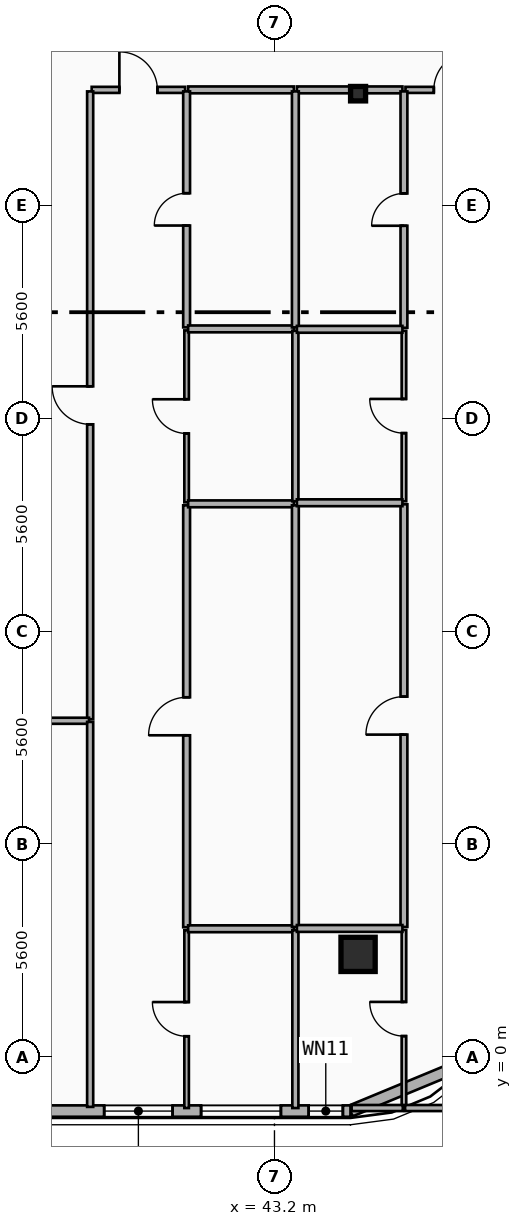
"""IFC4 building model, lengths in metres.
Left out: names, types, materials, properties, quantities, classifications, styles, units other than length and angle.
Written with IfcOpenShell. Run it as: python <this file> out.ifc"""

import sys

from ifc_helpers import new_model, si_unit, direction, frame, frame_2d, origin, origin_2d, place, context, subcontext, project, spatial, rectangle, i_section, extrude, element, fill, save


model = new_model("IFC4")
c1 = context("Model", 3, precision=1e-05, world=origin(), true_north=direction((0.0, 1.0)))
c2 = subcontext(c1, "Body", "Model", "MODEL_VIEW")
j1 = project(units=[si_unit("LENGTHUNIT", "METRE"), si_unit("PLANEANGLEUNIT", "RADIAN")], contexts=[c1])
p1 = place(None, origin())
s1 = spatial("IfcSite", under=j1, at=p1, CompositionType="ELEMENT")
p2 = place(p1, origin())
s2 = spatial("IfcBuilding", under=s1, at=p2, CompositionType="ELEMENT")
p3 = place(p2, frame((0.0, 0.0, 258.4)))
s3 = spatial("IfcBuildingStorey", under=s2, at=p3, CompositionType="ELEMENT", Elevation=258.4)
p4 = place(p3, frame((45.4, 25.35, 0.0), z_axis=(0.0, 0.0, 1.0), x_axis=(1.0, 0.0, 0.0)))
e1 = element("IfcColumn", 1, at=p4, inside=s3, PredefinedType="COLUMN", context=c2, shape_type="SweptSolid", body=[
    extrude(i_section(OverallWidth=0.395, OverallDepth=0.38, WebThickness=0.019, FlangeThickness=0.03, FilletRadius=0.015, at=origin_2d()), origin(), (0.0, 0.0, 1.0), 3.7),
])
p5 = place(p3, frame((45.4, 2.812, 0.0), z_axis=(0.0, -0.090221727315, 0.99592170371), x_axis=(1.0, 0.0, 0.0)))
e2 = element("IfcColumn", 2, at=p5, inside=s3, PredefinedType="COLUMN", context=c2, shape_type="SweptSolid", body=[
    extrude(rectangle(XDim=0.9, YDim=0.9, at=origin_2d()), origin(), (0.0, 0.0, 1.0), 3.715),
])
p6 = place(p3, frame((48.042, -0.243, 0.0), z_axis=(0.0, 0.0, 1.0), x_axis=(-0.92389884758, -0.382636798336, 0.0)))
e3 = element("IfcWall", 3, at=p6, inside=s3, PredefinedType="SOLIDWALL", context=c2, shape_type="SweptSolid", body=[
    extrude(rectangle(XDim=3.077, YDim=0.3, at=frame_2d((1.538, 0.0))), origin(), (0.0, 0.0, 1.0), 3.42),
])
p7 = place(p3, frame((45.2, -1.42, 0.0), z_axis=(0.0, 0.0, 1.0), x_axis=(-1.0, 0.0, 0.0)))
e4 = element("IfcWall", 4, at=p7, inside=s3, PredefinedType="SOLIDWALL", context=c2, shape_type="SweptSolid", body=[
    extrude(rectangle(XDim=32.8, YDim=0.3, at=frame_2d((16.4, 0.0))), origin(), (0.0, 0.0, 1.0), 3.42),
])
p8 = place(p7, frame((26.77, 0.0, 0.75)))
e5 = element("IfcOpeningElement", 5, at=p8, cuts=e4, PredefinedType="OPENING", context=c2, shape_type="SweptSolid", body=[
    extrude(rectangle(XDim=1.6, YDim=1.95, at=frame_2d((0.8, 0.975))), frame((0.0, 0.16, 0.0), z_axis=(0.0, -1.0, 0.0), x_axis=(1.0, 0.0, 0.0)), (0.0, 0.0, 1.0), 0.32),
])
p9 = place(p7, frame((29.115, 0.0, 0.75)))
e6 = element("IfcOpeningElement", 6, at=p9, cuts=e4, PredefinedType="OPENING", context=c2, shape_type="SweptSolid", body=[
    extrude(rectangle(XDim=2.1, YDim=2.1, at=frame_2d((1.05, 1.05))), frame((0.0, 0.16, 0.0), z_axis=(0.0, -1.0, 0.0), x_axis=(1.0, 0.0, 0.0)), (0.0, 0.0, 1.0), 0.32),
])
p10 = place(p7, frame((15.75, 0.0, 0.75)))
e7 = element("IfcOpeningElement", 7, at=p10, cuts=e4, PredefinedType="OPENING", context=c2, shape_type="SweptSolid", body=[
    extrude(rectangle(XDim=2.1, YDim=2.1, at=frame_2d((1.05, 1.05))), frame((0.0, 0.16, 0.0), z_axis=(0.0, -1.0, 0.0), x_axis=(1.0, 0.0, 0.0)), (0.0, 0.0, 1.0), 0.32),
])
p11 = place(p7, frame((4.681, 0.0, 0.8)))
e8 = element("IfcOpeningElement", 8, at=p11, cuts=e4, PredefinedType="OPENING", context=c2, shape_type="SweptSolid", body=[
    extrude(rectangle(XDim=1.8, YDim=1.8, at=frame_2d((0.9, 0.9))), frame((0.0, 0.16, 0.0), z_axis=(0.0, -1.0, 0.0), x_axis=(1.0, 0.0, 0.0)), (0.0, 0.0, 1.0), 0.32),
])
p12 = place(p7, frame((1.831, 0.0, 0.75)))
e9 = element("IfcOpeningElement", 9, at=p12, cuts=e4, PredefinedType="OPENING", context=c2, shape_type="SweptSolid", body=[
    extrude(rectangle(XDim=2.1, YDim=2.1, at=frame_2d((1.05, 1.05))), frame((0.0, 0.16, 0.0), z_axis=(0.0, -1.0, 0.0), x_axis=(1.0, 0.0, 0.0)), (0.0, 0.0, 1.0), 0.32),
])
p13 = place(p7, frame((0.2, 0.0, 0.9)))
e10 = element("IfcOpeningElement", 10, at=p13, cuts=e4, PredefinedType="OPENING", context=c2, shape_type="SweptSolid", body=[
    extrude(rectangle(XDim=0.9, YDim=1.05, at=frame_2d((0.45, 0.525))), frame((0.0, 0.16, 0.0), z_axis=(0.0, -1.0, 0.0), x_axis=(1.0, 0.0, 0.0)), (0.0, 0.0, 1.0), 0.32),
])
p14 = place(p7, frame((31.76, 0.0, 0.9)))
e11 = element("IfcOpeningElement", 11, at=p14, cuts=e4, PredefinedType="OPENING", context=c2, shape_type="SweptSolid", body=[
    extrude(rectangle(XDim=0.9, YDim=1.05, at=frame_2d((0.45, 0.525))), frame((0.0, 0.16, 0.0), z_axis=(0.0, -1.0, 0.0), x_axis=(1.0, 0.0, 0.0)), (0.0, 0.0, 1.0), 0.32),
])
p15 = place(p3, frame((38.39, 25.45, 0.0), z_axis=(0.0, 0.0, 1.0), x_axis=(1.0, 0.0, 0.0)))
e12 = element("IfcWall", 12, at=p15, inside=s3, PredefinedType="PARTITIONING", context=c2, shape_type="SweptSolid", body=[
    extrude(rectangle(XDim=2.458, YDim=0.16, at=frame_2d((1.229, 0.0))), origin(), (0.0, 0.0, 1.0), 3.42),
])
p16 = place(p15, frame((0.729, 0.0, 0.0)))
e13 = element("IfcOpeningElement", 13, at=p16, cuts=e12, PredefinedType="OPENING", context=c2, shape_type="SweptSolid", body=[
    extrude(rectangle(XDim=1.0, YDim=2.15, at=frame_2d((0.5, 1.075))), frame((0.0, 0.09, 0.0), z_axis=(0.0, -1.0, 0.0), x_axis=(1.0, 0.0, 0.0)), (0.0, 0.0, 1.0), 0.18),
])
p17 = place(p3, frame((40.928, 25.45, 0.0), z_axis=(0.0, 0.0, 1.0), x_axis=(1.0, 0.0, 0.0)))
e14 = element("IfcWall", 14, at=p17, inside=s3, PredefinedType="PLUMBINGWALL", context=c2, shape_type="SweptSolid", body=[
    extrude(rectangle(XDim=2.782, YDim=0.18, at=frame_2d((1.391, 0.0))), origin(), (0.0, 0.0, 1.0), 3.42),
])
p18 = place(p3, frame((46.647, 25.45, 0.0), z_axis=(0.0, 0.0, 1.0), x_axis=(1.0, 0.0, 0.0)))
e15 = element("IfcWall", 15, at=p18, inside=s3, PredefinedType="PARTITIONING", context=c2, shape_type="SweptSolid", body=[
    extrude(rectangle(XDim=2.493, YDim=0.16, at=frame_2d((1.247, 0.0))), origin(), (0.0, 0.0, 1.0), 3.42),
])
p19 = place(p18, frame((0.747, 0.0, 0.0)))
e16 = element("IfcOpeningElement", 16, at=p19, cuts=e15, PredefinedType="OPENING", context=c2, shape_type="SweptSolid", body=[
    extrude(rectangle(XDim=1.0, YDim=2.15, at=frame_2d((0.5, 1.075))), frame((0.0, 0.09, 0.0), z_axis=(0.0, -1.0, 0.0), x_axis=(1.0, 0.0, 0.0)), (0.0, 0.0, 1.0), 0.18),
])
p20 = place(p3, frame((43.79, 25.45, 0.0), z_axis=(0.0, 0.0, 1.0), x_axis=(1.0, 0.0, 0.0)))
e17 = element("IfcWall", 17, at=p20, inside=s3, PredefinedType="PLUMBINGWALL", context=c2, shape_type="SweptSolid", body=[
    extrude(rectangle(XDim=2.777, YDim=0.18, at=frame_2d((1.388, 0.0))), origin(), (0.0, 0.0, 1.0), 2.7),
])
p21 = place(p3, frame((38.35, 8.89, 0.0), z_axis=(0.0, 0.0, 1.0), x_axis=(0.0, 1.0, 0.0)))
e18 = element("IfcWall", 18, at=p21, inside=s3, PredefinedType="PARTITIONING", context=c2, shape_type="SweptSolid", body=[
    extrude(rectangle(XDim=16.52, YDim=0.16, at=frame_2d((8.26, 0.0))), origin(), (0.0, 0.0, 1.0), 2.95),
])
p22 = place(p21, frame((7.76, 0.0, 0.0)))
e19 = element("IfcOpeningElement", 19, at=p22, cuts=e18, PredefinedType="OPENING", context=c2, shape_type="SweptSolid", body=[
    extrude(rectangle(XDim=1.0, YDim=2.15, at=frame_2d((0.5, 1.075))), frame((0.0, 0.09, 0.0), z_axis=(0.0, -1.0, 0.0), x_axis=(1.0, 0.0, 0.0)), (0.0, 0.0, 1.0), 0.18),
])
p23 = place(p3, frame((40.888, -1.34, 0.0), z_axis=(0.0, 0.0, 1.0), x_axis=(0.0, 1.0, 0.0)))
e20 = element("IfcWall", 20, at=p23, inside=s3, PredefinedType="PARTITIONING", context=c2, shape_type="SweptSolid", body=[
    extrude(rectangle(XDim=4.677, YDim=0.12, at=frame_2d((2.338, 0.0))), origin(), (0.0, 0.0, 1.0), 3.08),
])
p24 = place(p23, frame((1.888, 0.0, 0.0)))
e21 = element("IfcOpeningElement", 21, at=p24, cuts=e20, PredefinedType="OPENING", context=c2, shape_type="SweptSolid", body=[
    extrude(rectangle(XDim=0.9, YDim=2.1, at=frame_2d((0.45, 1.05))), frame((0.0, 0.07, 0.0), z_axis=(0.0, -1.0, 0.0), x_axis=(1.0, 0.0, 0.0)), (0.0, 0.0, 1.0), 0.14),
])
p25 = place(p3, frame((40.888, 3.417, 0.0), z_axis=(0.0, 0.0, 1.0), x_axis=(0.0, 1.0, 0.0)))
e22 = element("IfcWall", 22, at=p25, inside=s3, PredefinedType="PLUMBINGWALL", context=c2, shape_type="SweptSolid", body=[
    extrude(rectangle(XDim=11.101, YDim=0.18, at=frame_2d((5.551, 0.0))), origin(), (0.0, 0.0, 1.0), 2.95),
])
p26 = place(p25, frame((5.051, 0.0, 0.0)))
e23 = element("IfcOpeningElement", 23, at=p26, cuts=e22, PredefinedType="OPENING", context=c2, shape_type="SweptSolid", body=[
    extrude(rectangle(XDim=1.0, YDim=2.15, at=frame_2d((0.5, 1.075))), frame((0.0, 0.1, 0.0), z_axis=(0.0, -1.0, 0.0), x_axis=(1.0, 0.0, 0.0)), (0.0, 0.0, 1.0), 0.2),
])
p27 = place(p3, frame((40.888, 14.598, 0.0), z_axis=(0.0, 0.0, 1.0), x_axis=(0.0, 1.0, 0.0)))
e24 = element("IfcWall", 24, at=p27, inside=s3, PredefinedType="PARTITIONING", context=c2, shape_type="SweptSolid", body=[
    extrude(rectangle(XDim=4.523, YDim=0.12, at=frame_2d((2.262, 0.0))), origin(), (0.0, 0.0, 1.0), 2.95),
])
p28 = place(p27, frame((1.812, 0.0, 0.0)))
e25 = element("IfcOpeningElement", 25, at=p28, cuts=e24, PredefinedType="OPENING", context=c2, shape_type="SweptSolid", body=[
    extrude(rectangle(XDim=0.9, YDim=2.1, at=frame_2d((0.45, 1.05))), frame((0.0, 0.07, 0.0), z_axis=(0.0, -1.0, 0.0), x_axis=(1.0, 0.0, 0.0)), (0.0, 0.0, 1.0), 0.14),
])
p29 = place(p3, frame((40.888, 19.201, 0.0), z_axis=(0.0, 0.0, 1.0), x_axis=(0.0, 1.0, 0.0)))
e26 = element("IfcWall", 26, at=p29, inside=s3, PredefinedType="PLUMBINGWALL", context=c2, shape_type="SweptSolid", body=[
    extrude(rectangle(XDim=6.209, YDim=0.18, at=frame_2d((3.104, 0.0))), origin(), (0.0, 0.0, 1.0), 2.95),
])
p30 = place(p29, frame((2.679, 0.0, 0.0)))
e27 = element("IfcOpeningElement", 27, at=p30, cuts=e26, PredefinedType="OPENING", context=c2, shape_type="SweptSolid", body=[
    extrude(rectangle(XDim=0.85, YDim=2.1, at=frame_2d((0.425, 1.05))), frame((0.0, 0.1, 0.0), z_axis=(0.0, -1.0, 0.0), x_axis=(1.0, 0.0, 0.0)), (0.0, 0.0, 1.0), 0.2),
])
p31 = place(p3, frame((40.928, 3.377, 0.0), z_axis=(0.0, 0.0, 1.0), x_axis=(1.0, 0.0, 0.0)))
e28 = element("IfcWall", 28, at=p31, inside=s3, PredefinedType="PLUMBINGWALL", context=c2, shape_type="SweptSolid", body=[
    extrude(rectangle(XDim=2.782, YDim=0.18, at=frame_2d((1.391, 0.0))), origin(), (0.0, 0.0, 1.0), 3.42),
])
p32 = place(p3, frame((43.75, -1.34, 0.0), z_axis=(0.0, 0.0, 1.0), x_axis=(0.0, 1.0, 0.0)))
e29 = element("IfcWall", 29, at=p32, inside=s3, PredefinedType="PARTITIONING", context=c2, shape_type="SweptSolid", body=[
    extrude(rectangle(XDim=4.677, YDim=0.16, at=frame_2d((2.338, 0.0))), origin(), (0.0, 0.0, 1.0), 3.08),
])
p33 = place(p3, frame((40.928, 14.558, 0.0), z_axis=(0.0, 0.0, 1.0), x_axis=(1.0, 0.0, 0.0)))
e30 = element("IfcWall", 30, at=p33, inside=s3, PredefinedType="PLUMBINGWALL", context=c2, shape_type="SweptSolid", body=[
    extrude(rectangle(XDim=2.782, YDim=0.18, at=frame_2d((1.391, 0.0))), origin(), (0.0, 0.0, 1.0), 2.95),
])
p34 = place(p3, frame((43.75, 3.425, 0.0), z_axis=(0.0, 0.0, 1.0), x_axis=(0.0, 1.0, 0.0)))
e31 = element("IfcWall", 31, at=p34, inside=s3, PredefinedType="PLUMBINGWALL", context=c2, shape_type="SweptSolid", body=[
    extrude(rectangle(XDim=11.093, YDim=0.18, at=frame_2d((5.546, 0.0))), origin(), (0.0, 0.0, 1.0), 2.95),
])
p35 = place(p3, frame((40.928, 19.161, 0.0), z_axis=(0.0, 0.0, 1.0), x_axis=(1.0, 0.0, 0.0)))
e32 = element("IfcWall", 32, at=p35, inside=s3, PredefinedType="PLUMBINGWALL", context=c2, shape_type="SweptSolid", body=[
    extrude(rectangle(XDim=2.782, YDim=0.18, at=frame_2d((1.391, 0.0))), origin(), (0.0, 0.0, 1.0), 2.96),
])
p36 = place(p3, frame((43.75, 14.626, 0.0), z_axis=(0.0, 0.0, 1.0), x_axis=(0.0, 1.0, 0.0)))
e33 = element("IfcWall", 33, at=p36, inside=s3, PredefinedType="PARTITIONING", context=c2, shape_type="SweptSolid", body=[
    extrude(rectangle(XDim=4.484, YDim=0.16, at=frame_2d((2.242, 0.0))), origin(), (0.0, 0.0, 1.0), 2.95),
])
p37 = place(p3, frame((43.75, 19.201, 0.0), z_axis=(0.0, 0.0, 1.0), x_axis=(0.0, 1.0, 0.0)))
e34 = element("IfcWall", 34, at=p37, inside=s3, PredefinedType="PLUMBINGWALL", context=c2, shape_type="SweptSolid", body=[
    extrude(rectangle(XDim=6.209, YDim=0.18, at=frame_2d((3.104, 0.0))), origin(), (0.0, 0.0, 1.0), 2.95),
])
p38 = place(p3, frame((46.607, -1.34, 0.0), z_axis=(0.0, 0.0, 1.0), x_axis=(0.0, 1.0, 0.0)))
e35 = element("IfcWall", 35, at=p38, inside=s3, PredefinedType="PARTITIONING", context=c2, shape_type="SweptSolid", body=[
    extrude(rectangle(XDim=4.685, YDim=0.12, at=frame_2d((2.343, 0.0))), origin(), (0.0, 0.0, 1.0), 3.42),
])
p39 = place(p38, frame((1.893, 0.0, 0.0)))
e36 = element("IfcOpeningElement", 36, at=p39, cuts=e35, PredefinedType="OPENING", context=c2, shape_type="SweptSolid", body=[
    extrude(rectangle(XDim=0.9, YDim=2.1, at=frame_2d((0.45, 1.05))), frame((0.0, 0.07, 0.0), z_axis=(0.0, -1.0, 0.0), x_axis=(1.0, 0.0, 0.0)), (0.0, 0.0, 1.0), 0.14),
])
p40 = place(p3, frame((46.607, 3.425, 0.0), z_axis=(0.0, 0.0, 1.0), x_axis=(0.0, 1.0, 0.0)))
e37 = element("IfcWall", 37, at=p40, inside=s3, PredefinedType="PLUMBINGWALL", context=c2, shape_type="SweptSolid", body=[
    extrude(rectangle(XDim=11.121, YDim=0.18, at=frame_2d((5.561, 0.0))), origin(), (0.0, 0.0, 1.0), 3.42),
])
p41 = place(p40, frame((5.061, 0.0, 0.0)))
e38 = element("IfcOpeningElement", 38, at=p41, cuts=e37, PredefinedType="OPENING", context=c2, shape_type="SweptSolid", body=[
    extrude(rectangle(XDim=1.0, YDim=2.15, at=frame_2d((0.5, 1.075))), frame((0.0, 0.1, 0.0), z_axis=(0.0, -1.0, 0.0), x_axis=(1.0, 0.0, 0.0)), (0.0, 0.0, 1.0), 0.2),
])
p42 = place(p3, frame((46.607, 14.626, 0.0), z_axis=(0.0, 0.0, 1.0), x_axis=(0.0, 1.0, 0.0)))
e39 = element("IfcWall", 39, at=p42, inside=s3, PredefinedType="PARTITIONING", context=c2, shape_type="SweptSolid", body=[
    extrude(rectangle(XDim=4.484, YDim=0.12, at=frame_2d((2.242, 0.0))), origin(), (0.0, 0.0, 1.0), 3.42),
])
p43 = place(p42, frame((1.792, 0.0, 0.0)))
e40 = element("IfcOpeningElement", 40, at=p43, cuts=e39, PredefinedType="OPENING", context=c2, shape_type="SweptSolid", body=[
    extrude(rectangle(XDim=0.9, YDim=2.1, at=frame_2d((0.45, 1.05))), frame((0.0, 0.07, 0.0), z_axis=(0.0, -1.0, 0.0), x_axis=(1.0, 0.0, 0.0)), (0.0, 0.0, 1.0), 0.14),
])
p44 = place(p3, frame((46.607, 19.19, 0.0), z_axis=(0.0, 0.0, 1.0), x_axis=(0.0, 1.0, 0.0)))
e41 = element("IfcWall", 41, at=p44, inside=s3, PredefinedType="PLUMBINGWALL", context=c2, shape_type="SweptSolid", body=[
    extrude(rectangle(XDim=6.22, YDim=0.18, at=frame_2d((3.11, 0.0))), origin(), (0.0, 0.0, 1.0), 2.9),
])
p45 = place(p44, frame((2.685, 0.0, 0.0)))
e42 = element("IfcOpeningElement", 42, at=p45, cuts=e41, PredefinedType="OPENING", context=c2, shape_type="SweptSolid", body=[
    extrude(rectangle(XDim=0.85, YDim=2.1, at=frame_2d((0.425, 1.05))), frame((0.0, 0.1, 0.0), z_axis=(0.0, -1.0, 0.0), x_axis=(1.0, 0.0, 0.0)), (0.0, 0.0, 1.0), 0.2),
])
for number, where, z_axis, x_axis in (
    (43, (43.79, 3.385, 0.0), (0.0, 0.0, 1.0), (1.0, 0.0, 0.0)),
    (44, (43.79, 14.586, 0.0), (0.0, 0.0, 1.0), (1.0, 0.0, 0.0)),
    (45, (43.79, 19.15, 0.0), (0.0, 0.0, 1.0), (1.0, 0.0, 0.0)),
):
    element("IfcWall", number, at=place(p3, frame(where, z_axis=z_axis, x_axis=x_axis)), inside=s3, PredefinedType="PLUMBINGWALL", context=c2, shape_type="SweptSolid", body=[
        extrude(rectangle(XDim=2.777, YDim=0.18, at=frame_2d((1.388, 0.0))), origin(), (0.0, 0.0, 1.0), 2.7),
    ])
p46 = place(p3, frame((36.38, 8.85, 0.0), z_axis=(0.0, 0.0, 1.0), x_axis=(1.0, 0.0, 0.0)))
e46 = element("IfcWall", 46, at=p46, inside=s3, PredefinedType="PARTITIONING", context=c2, shape_type="SweptSolid", body=[
    extrude(rectangle(XDim=1.94, YDim=0.16, at=frame_2d((0.97, 0.0))), origin(), (0.0, 0.0, 1.0), 2.7),
])
p47 = place(p3, frame((38.35, -1.31, 0.0), z_axis=(0.0, 0.0, 1.0), x_axis=(0.0, 1.0, 0.0)))
e47 = element("IfcWall", 47, at=p47, inside=s3, PredefinedType="PARTITIONING", context=c2, shape_type="SweptSolid", body=[
    extrude(rectangle(XDim=10.13, YDim=0.16, at=frame_2d((5.065, 0.0))), origin(), (0.0, 0.0, 1.0), 2.95),
])
p48 = place(p3, frame((46.637, -1.34, 0.0), z_axis=(0.0, 0.0, 1.0), x_axis=(1.0, 0.0, 0.0)))
e48 = element("IfcWall", 48, at=p48, inside=s3, PredefinedType="PARTITIONING", context=c2, shape_type="SweptSolid", body=[
    extrude(rectangle(XDim=2.473, YDim=0.16, at=frame_2d((1.237, 0.0))), origin(), (0.0, 0.0, 1.0), 3.42),
])
p49 = place(p3, frame((45.23, -1.34, 0.0), z_axis=(0.0, 0.0, 1.0), x_axis=(1.0, 0.0, 0.0)))
e49 = element("IfcWall", 49, at=p49, inside=s3, PredefinedType="PARTITIONING", context=c2, shape_type="SweptSolid", body=[
    extrude(rectangle(XDim=1.347, YDim=0.16, at=frame_2d((0.673, 0.0))), origin(), (0.0, 0.0, 1.0), 3.42),
])
p50 = place(p11, origin())
e50 = element("IfcWindow", 50, at=p50, inside=s3, PartitioningType="SINGLE_PANEL", PredefinedType="WINDOW", context=c2, shape_type="SweptSolid", body=[
    extrude(rectangle(XDim=1.8, YDim=1.8, at=frame_2d((0.9, 0.9))), frame((0.0, 0.03, 0.0), z_axis=(0.0, -1.0, 0.0), x_axis=(1.0, 0.0, 0.0)), (0.0, 0.0, 1.0), 0.06),
])
fill(e8, e50)
p51 = place(p12, origin())
e51 = element("IfcWindow", 51, at=p51, inside=s3, PartitioningType="SINGLE_PANEL", PredefinedType="WINDOW", context=c2, shape_type="SweptSolid", body=[
    extrude(rectangle(XDim=2.1, YDim=2.1, at=frame_2d((1.05, 1.05))), frame((0.0, 0.03, 0.0), z_axis=(0.0, -1.0, 0.0), x_axis=(1.0, 0.0, 0.0)), (0.0, 0.0, 1.0), 0.06),
])
fill(e9, e51)
p52 = place(p13, origin())
e52 = element("IfcWindow", 52, at=p52, inside=s3, PartitioningType="SINGLE_PANEL", PredefinedType="WINDOW", context=c2, shape_type="SweptSolid", body=[
    extrude(rectangle(XDim=0.9, YDim=1.05, at=frame_2d((0.45, 0.525))), frame((0.0, 0.03, 0.0), z_axis=(0.0, -1.0, 0.0), x_axis=(1.0, 0.0, 0.0)), (0.0, 0.0, 1.0), 0.06),
])
fill(e10, e52)
p53 = place(p16, origin())
e53 = element("IfcDoor", 53, at=p53, inside=s3, OperationType="SINGLE_SWING_LEFT", PredefinedType="DOOR", context=c2, shape_type="SweptSolid", body=[
    extrude(rectangle(XDim=1.0, YDim=2.15, at=frame_2d((0.5, 1.075))), frame((0.0, 0.025, 0.0), z_axis=(0.0, -1.0, 0.0), x_axis=(1.0, 0.0, 0.0)), (0.0, 0.0, 1.0), 0.05),
])
fill(e13, e53)
p54 = place(p19, origin())
e54 = element("IfcDoor", 54, at=p54, inside=s3, OperationType="SINGLE_SWING_RIGHT", PredefinedType="DOOR", context=c2, shape_type="SweptSolid", body=[
    extrude(rectangle(XDim=1.0, YDim=2.15, at=frame_2d((0.5, 1.075))), frame((0.0, 0.025, 0.0), z_axis=(0.0, -1.0, 0.0), x_axis=(1.0, 0.0, 0.0)), (0.0, 0.0, 1.0), 0.05),
])
fill(e16, e54)
p55 = place(p22, origin())
e55 = element("IfcDoor", 55, at=p55, inside=s3, OperationType="SINGLE_SWING_RIGHT", PredefinedType="DOOR", context=c2, shape_type="SweptSolid", body=[
    extrude(rectangle(XDim=1.0, YDim=2.15, at=frame_2d((0.5, 1.075))), frame((0.0, 0.025, 0.0), z_axis=(0.0, -1.0, 0.0), x_axis=(1.0, 0.0, 0.0)), (0.0, 0.0, 1.0), 0.05),
])
fill(e19, e55)
p56 = place(p24, origin())
e56 = element("IfcDoor", 56, at=p56, inside=s3, OperationType="SINGLE_SWING_RIGHT", PredefinedType="DOOR", context=c2, shape_type="SweptSolid", body=[
    extrude(rectangle(XDim=0.9, YDim=2.1, at=frame_2d((0.45, 1.05))), frame((0.0, 0.025, 0.0), z_axis=(0.0, -1.0, 0.0), x_axis=(1.0, 0.0, 0.0)), (0.0, 0.0, 1.0), 0.05),
])
fill(e21, e56)
p57 = place(p26, origin())
e57 = element("IfcDoor", 57, at=p57, inside=s3, OperationType="SINGLE_SWING_LEFT", PredefinedType="DOOR", context=c2, shape_type="SweptSolid", body=[
    extrude(rectangle(XDim=1.0, YDim=2.15, at=frame_2d((0.5, 1.075))), frame((0.0, 0.025, 0.0), z_axis=(0.0, -1.0, 0.0), x_axis=(1.0, 0.0, 0.0)), (0.0, 0.0, 1.0), 0.05),
])
fill(e23, e57)
p58 = place(p28, origin())
e58 = element("IfcDoor", 58, at=p58, inside=s3, OperationType="SINGLE_SWING_RIGHT", PredefinedType="DOOR", context=c2, shape_type="SweptSolid", body=[
    extrude(rectangle(XDim=0.9, YDim=2.1, at=frame_2d((0.45, 1.05))), frame((0.0, 0.025, 0.0), z_axis=(0.0, -1.0, 0.0), x_axis=(1.0, 0.0, 0.0)), (0.0, 0.0, 1.0), 0.05),
])
fill(e25, e58)
p59 = place(p30, origin())
e59 = element("IfcDoor", 59, at=p59, inside=s3, OperationType="SINGLE_SWING_LEFT", PredefinedType="DOOR", context=c2, shape_type="SweptSolid", body=[
    extrude(rectangle(XDim=0.85, YDim=2.1, at=frame_2d((0.425, 1.05))), frame((0.0, 0.025, 0.0), z_axis=(0.0, -1.0, 0.0), x_axis=(1.0, 0.0, 0.0)), (0.0, 0.0, 1.0), 0.05),
])
fill(e27, e59)
p60 = place(p39, origin())
e60 = element("IfcDoor", 60, at=p60, inside=s3, OperationType="SINGLE_SWING_RIGHT", PredefinedType="DOOR", context=c2, shape_type="SweptSolid", body=[
    extrude(rectangle(XDim=0.9, YDim=2.1, at=frame_2d((0.45, 1.05))), frame((0.0, 0.025, 0.0), z_axis=(0.0, -1.0, 0.0), x_axis=(1.0, 0.0, 0.0)), (0.0, 0.0, 1.0), 0.05),
])
fill(e36, e60)
p61 = place(p41, origin())
e61 = element("IfcDoor", 61, at=p61, inside=s3, OperationType="SINGLE_SWING_LEFT", PredefinedType="DOOR", context=c2, shape_type="SweptSolid", body=[
    extrude(rectangle(XDim=1.0, YDim=2.15, at=frame_2d((0.5, 1.075))), frame((0.0, 0.025, 0.0), z_axis=(0.0, -1.0, 0.0), x_axis=(1.0, 0.0, 0.0)), (0.0, 0.0, 1.0), 0.05),
])
fill(e38, e61)
p62 = place(p43, origin())
e62 = element("IfcDoor", 62, at=p62, inside=s3, OperationType="SINGLE_SWING_RIGHT", PredefinedType="DOOR", context=c2, shape_type="SweptSolid", body=[
    extrude(rectangle(XDim=0.9, YDim=2.1, at=frame_2d((0.45, 1.05))), frame((0.0, 0.025, 0.0), z_axis=(0.0, -1.0, 0.0), x_axis=(1.0, 0.0, 0.0)), (0.0, 0.0, 1.0), 0.05),
])
fill(e40, e62)
p63 = place(p45, origin())
e63 = element("IfcDoor", 63, at=p63, inside=s3, OperationType="SINGLE_SWING_LEFT", PredefinedType="DOOR", context=c2, shape_type="SweptSolid", body=[
    extrude(rectangle(XDim=0.85, YDim=2.1, at=frame_2d((0.425, 1.05))), frame((0.0, 0.025, 0.0), z_axis=(0.0, -1.0, 0.0), x_axis=(1.0, 0.0, 0.0)), (0.0, 0.0, 1.0), 0.05),
])
fill(e42, e63)
save(model, sys.argv[1])
